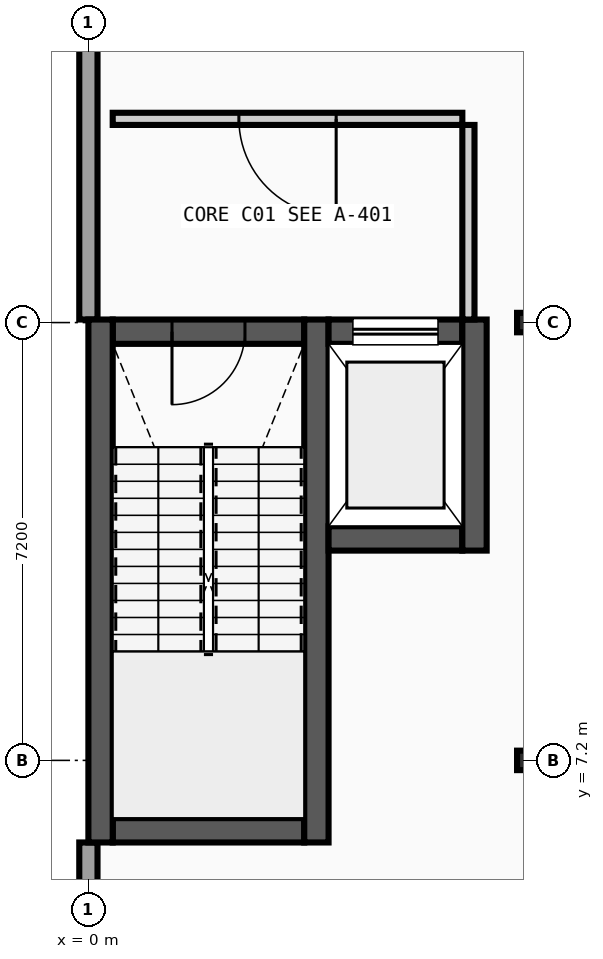
"""IFC4 building model, lengths in metres.
Left out: names, types, materials, properties, quantities, classifications, styles, units other than length and angle.
Written with IfcOpenShell. Run it as: python <this file> out.ifc"""

import sys

from ifc_helpers import new_model, si_unit, direction, frame, frame_2d, origin, origin_2d, place, context, subcontext, project, spatial, rectangle, i_section, extrude, element, fill, save


model = new_model("IFC4")
c1 = context("Model", 3, precision=1e-05, world=origin(), true_north=direction((0.0, 1.0)))
c2 = subcontext(c1, "Body", "Model", "MODEL_VIEW")
j1 = project(units=[si_unit("LENGTHUNIT", "METRE"), si_unit("PLANEANGLEUNIT", "RADIAN")], contexts=[c1])
p1 = place(None, origin())
s1 = spatial("IfcSite", under=j1, at=p1, CompositionType="ELEMENT")
p2 = place(p1, origin())
s2 = spatial("IfcBuilding", under=s1, at=p2, CompositionType="ELEMENT")
p3 = place(p2, frame((0.0, 0.0, 22.8)))
s3 = spatial("IfcBuildingStorey", under=s2, at=p3, CompositionType="ELEMENT", Elevation=22.8)
for number, where, z_axis, x_axis in (
    (1, (7.2, 7.2, 0.0), (0.0, 0.0, 1.0), (1.0, 0.0, 0.0)),
    (2, (7.2, 14.4, 0.0), (0.0, 0.0, 1.0), (1.0, 0.0, 0.0)),
):
    element("IfcColumn", number, at=place(p3, frame(where, z_axis=z_axis, x_axis=x_axis)), inside=s3, PredefinedType="COLUMN", context=c2, shape_type="SweptSolid", body=[
        extrude(i_section(OverallWidth=0.3, OverallDepth=0.32, WebThickness=0.011, FlangeThickness=0.021, FilletRadius=0.027, at=origin_2d()), origin(), (0.0, 0.0, 1.0), 4.4),
    ])
p4 = place(p3, frame((0.0, 5.85, 0.0), z_axis=(0.0, 0.0, 1.0), x_axis=(0.0, -1.0, 0.0)))
e3 = element("IfcWall", 3, at=p4, inside=s3, PredefinedType="STANDARD", context=c2, shape_type="SweptSolid", body=[
    extrude(rectangle(XDim=5.7, YDim=0.3, at=frame_2d((2.85, 0.0))), origin(), (0.0, 0.0, 1.0), 4.215),
])
p5 = place(p4, frame((1.95, 0.0, 0.9)))
e4 = element("IfcOpeningElement", 4, at=p5, cuts=e3, PredefinedType="OPENING", context=c2, shape_type="SweptSolid", body=[
    extrude(rectangle(XDim=1.8, YDim=1.8, at=frame_2d((0.9, 0.9))), frame((0.0, 0.16, 0.0), z_axis=(0.0, -1.0, 0.0), x_axis=(1.0, 0.0, 0.0)), (0.0, 0.0, 1.0), 0.32),
])
p6 = place(p3, frame((0.0, 21.6, 0.0), z_axis=(0.0, 0.0, 1.0), x_axis=(0.0, -1.0, 0.0)))
e5 = element("IfcWall", 5, at=p6, inside=s3, PredefinedType="STANDARD", context=c2, shape_type="SweptSolid", body=[
    extrude(rectangle(XDim=7.15, YDim=0.3, at=frame_2d((3.575, 0.0))), origin(), (0.0, 0.0, 1.0), 4.215),
])
p7 = place(p3, frame((0.4, 6.05, 0.0), z_axis=(0.0, 0.0, 1.0), x_axis=(1.0, 0.0, 0.0)))
e6 = element("IfcWall", 6, at=p7, inside=s3, PredefinedType="SHEAR", context=c2, shape_type="SweptSolid", body=[
    extrude(rectangle(XDim=3.15, YDim=0.4, at=frame_2d((1.575, 0.0))), origin(), (0.0, 0.0, 1.0), 4.215),
])
p8 = place(p3, frame((0.4, 14.25, 0.0), z_axis=(0.0, 0.0, 1.0), x_axis=(1.0, 0.0, 0.0)))
e7 = element("IfcWall", 7, at=p8, inside=s3, PredefinedType="SHEAR", context=c2, shape_type="SweptSolid", body=[
    extrude(rectangle(XDim=3.15, YDim=0.4, at=frame_2d((1.575, 0.0))), origin(), (0.0, 0.0, 1.0), 4.215),
])
p9 = place(p8, frame((0.975, 0.0, 0.0)))
e8 = element("IfcOpeningElement", 8, at=p9, cuts=e7, PredefinedType="OPENING", context=c2, shape_type="SweptSolid", body=[
    extrude(rectangle(XDim=1.2, YDim=2.15, at=frame_2d((0.6, 1.075))), frame((0.0, 0.21, 0.0), z_axis=(0.0, -1.0, 0.0), x_axis=(1.0, 0.0, 0.0)), (0.0, 0.0, 1.0), 0.42),
])
for number, where, z_axis, x_axis in (
    (9, (0.2, 5.85, 0.0), (0.0, 0.0, 1.0), (0.0, 1.0, 0.0)),
    (10, (3.75, 5.85, 0.0), (0.0, 0.0, 1.0), (0.0, 1.0, 0.0)),
):
    element("IfcWall", number, at=place(p3, frame(where, z_axis=z_axis, x_axis=x_axis)), inside=s3, PredefinedType="SHEAR", context=c2, shape_type="SweptSolid", body=[
        extrude(rectangle(XDim=8.6, YDim=0.4, at=frame_2d((4.3, 0.0))), origin(), (0.0, 0.0, 1.0), 4.215),
    ])
p10 = place(p3, frame((3.95, 10.85, 0.0), z_axis=(0.0, 0.0, 1.0), x_axis=(1.0, 0.0, 0.0)))
e11 = element("IfcWall", 11, at=p10, inside=s3, PredefinedType="SHEAR", context=c2, shape_type="SweptSolid", body=[
    extrude(rectangle(XDim=2.2, YDim=0.4, at=frame_2d((1.1, 0.0))), origin(), (0.0, 0.0, 1.0), 4.215),
])
p11 = place(p3, frame((3.95, 14.25, 0.0), z_axis=(0.0, 0.0, 1.0), x_axis=(1.0, 0.0, 0.0)))
e12 = element("IfcWall", 12, at=p11, inside=s3, PredefinedType="SHEAR", context=c2, shape_type="SweptSolid", body=[
    extrude(rectangle(XDim=2.2, YDim=0.4, at=frame_2d((1.1, 0.0))), origin(), (0.0, 0.0, 1.0), 4.215),
])
p12 = place(p11, frame((0.4, 0.0, 0.0)))
e13 = element("IfcOpeningElement", 13, at=p12, cuts=e12, PredefinedType="OPENING", context=c2, shape_type="SweptSolid", body=[
    extrude(rectangle(XDim=1.4, YDim=2.2, at=frame_2d((0.7, 1.1))), frame((0.0, 0.21, 0.0), z_axis=(0.0, -1.0, 0.0), x_axis=(1.0, 0.0, 0.0)), (0.0, 0.0, 1.0), 0.42),
])
p13 = place(p3, frame((6.35, 10.65, 0.0), z_axis=(0.0, 0.0, 1.0), x_axis=(0.0, 1.0, 0.0)))
e14 = element("IfcWall", 14, at=p13, inside=s3, PredefinedType="SHEAR", context=c2, shape_type="SweptSolid", body=[
    extrude(rectangle(XDim=3.8, YDim=0.4, at=frame_2d((1.9, 0.0))), origin(), (0.0, 0.0, 1.0), 4.215),
])
p14 = place(p3, frame((0.4, 17.75, 0.0), z_axis=(0.0, 0.0, 1.0), x_axis=(1.0, 0.0, 0.0)))
e15 = element("IfcWall", 15, at=p14, inside=s3, PredefinedType="PARTITIONING", context=c2, shape_type="SweptSolid", body=[
    extrude(rectangle(XDim=5.75, YDim=0.2, at=frame_2d((2.875, 0.0))), origin(), (0.0, 0.0, 1.0), 4.215),
])
p15 = place(p14, frame((2.075, 0.0, 0.0)))
e16 = element("IfcOpeningElement", 16, at=p15, cuts=e15, PredefinedType="OPENING", context=c2, shape_type="SweptSolid", body=[
    extrude(rectangle(XDim=1.6, YDim=2.2, at=frame_2d((0.8, 1.1))), frame((0.0, 0.11, 0.0), z_axis=(0.0, -1.0, 0.0), x_axis=(1.0, 0.0, 0.0)), (0.0, 0.0, 1.0), 0.22),
])
p16 = place(p3, frame((6.25, 14.45, 0.0), z_axis=(0.0, 0.0, 1.0), x_axis=(0.0, 1.0, 0.0)))
e17 = element("IfcWall", 17, at=p16, inside=s3, PredefinedType="PARTITIONING", context=c2, shape_type="SweptSolid", body=[
    extrude(rectangle(XDim=3.2, YDim=0.2, at=frame_2d((1.6, 0.0))), origin(), (0.0, 0.0, 1.0), 4.215),
])
p17 = place(p9, frame((1.2, 0.0, 0.0), z_axis=(0.0, 0.0, 1.0), x_axis=(-1.0, 0.0, 0.0)))
e18 = element("IfcDoor", 18, at=p17, inside=s3, OperationType="SINGLE_SWING_LEFT", PredefinedType="DOOR", context=c2, shape_type="SweptSolid", body=[
    extrude(rectangle(XDim=1.2, YDim=2.15, at=frame_2d((0.6, 1.075))), frame((0.0, 0.025, 0.0), z_axis=(0.0, -1.0, 0.0), x_axis=(1.0, 0.0, 0.0)), (0.0, 0.0, 1.0), 0.05),
])
fill(e8, e18)
p18 = place(p12, origin())
e19 = element("IfcDoor", 19, at=p18, inside=s3, OperationType="SLIDING_TO_LEFT", PredefinedType="DOOR", context=c2, shape_type="SweptSolid", body=[
    extrude(rectangle(XDim=1.4, YDim=2.2, at=frame_2d((0.7, 1.1))), frame((0.0, 0.025, 0.0), z_axis=(0.0, -1.0, 0.0), x_axis=(1.0, 0.0, 0.0)), (0.0, 0.0, 1.0), 0.05),
])
fill(e13, e19)
p19 = place(p15, origin())
e20 = element("IfcDoor", 20, at=p19, inside=s3, OperationType="DOUBLE_DOOR_SINGLE_SWING", PredefinedType="DOOR", context=c2, shape_type="SweptSolid", body=[
    extrude(rectangle(XDim=1.6, YDim=2.2, at=frame_2d((0.8, 1.1))), frame((0.0, 0.025, 0.0), z_axis=(0.0, -1.0, 0.0), x_axis=(1.0, 0.0, 0.0)), (0.0, 0.0, 1.0), 0.05),
])
fill(e16, e20)
save(model, sys.argv[1])
